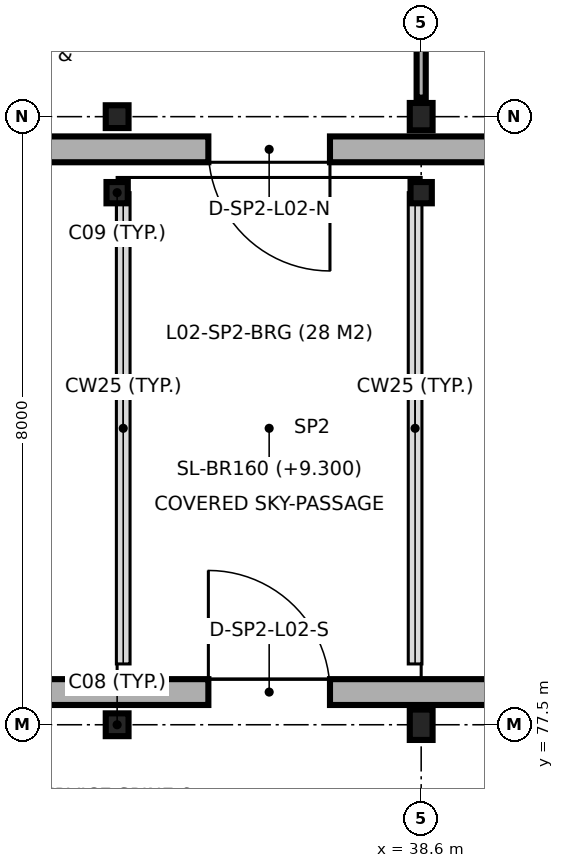
"""IFC4 building model, lengths in metres.
Left out: names, types, materials, properties, quantities, classifications, styles, units other than length and angle.
Written with IfcOpenShell. Run it as: python <this file> out.ifc"""

import sys

from ifc_helpers import new_model, si_unit, direction, frame, frame_2d, origin, origin_2d, place, context, subcontext, project, spatial, rectangle, i_section, extrude, element, fill, save


model = new_model("IFC4")
c1 = context("Model", 3, precision=1e-05, world=origin(), true_north=direction((0.0, 1.0)))
c2 = subcontext(c1, "Body", "Model", "MODEL_VIEW")
j1 = project(units=[si_unit("LENGTHUNIT", "METRE"), si_unit("PLANEANGLEUNIT", "RADIAN")], contexts=[c1])
p1 = place(None, origin())
s1 = spatial("IfcSite", under=j1, at=p1, CompositionType="ELEMENT")
p2 = place(p1, origin())
s2 = spatial("IfcBuilding", under=s1, at=p2, CompositionType="ELEMENT")
p3 = place(p2, frame((0.0, 0.0, 9.3)))
s3 = spatial("IfcBuildingStorey", under=s2, at=p3, CompositionType="ELEMENT", Elevation=9.3)
p4 = place(p3, frame((34.6, 77.5, 0.0), z_axis=(0.0, 0.0, 1.0), x_axis=(1.0, 0.0, 0.0)))
e1 = element("IfcColumn", 1, at=p4, inside=s3, PredefinedType="COLUMN", context=c2, shape_type="SweptSolid", body=[
    extrude(i_section(OverallWidth=0.3, OverallDepth=0.3, WebThickness=0.011, FlangeThickness=0.019, FilletRadius=0.027, at=origin_2d()), origin(), (0.0, 0.0, 1.0), 4.5),
])
p5 = place(p3, frame((34.6, 84.5, 0.0), z_axis=(0.0, 0.0, 1.0), x_axis=(1.0, 0.0, 0.0)))
e2 = element("IfcColumn", 2, at=p5, inside=s3, PredefinedType="COLUMN", context=c2, shape_type="SweptSolid", body=[
    extrude(i_section(OverallWidth=0.28, OverallDepth=0.28, WebThickness=0.01, FlangeThickness=0.018, FilletRadius=0.024, at=origin_2d()), origin(), (0.0, 0.0, 1.0), 4.5),
])
p6 = place(p3, frame((34.6, 85.5, 0.0), z_axis=(0.0, 0.0, 1.0), x_axis=(1.0, 0.0, 0.0)))
e3 = element("IfcColumn", 3, at=p6, inside=s3, PredefinedType="COLUMN", context=c2, shape_type="SweptSolid", body=[
    extrude(i_section(OverallWidth=0.3, OverallDepth=0.3, WebThickness=0.011, FlangeThickness=0.019, FilletRadius=0.027, at=origin_2d()), origin(), (0.0, 0.0, 1.0), 4.5),
])
p7 = place(p3, frame((38.6, 77.5, 0.0), z_axis=(0.0, 0.0, 1.0), x_axis=(1.0, 0.0, 0.0)))
e4 = element("IfcColumn", 4, at=p7, inside=s3, PredefinedType="COLUMN", context=c2, shape_type="SweptSolid", body=[
    extrude(i_section(OverallWidth=0.3, OverallDepth=0.4, WebThickness=0.013, FlangeThickness=0.024, FilletRadius=0.027, at=origin_2d()), origin(), (0.0, 0.0, 1.0), 4.5),
])
p8 = place(p3, frame((38.6, 84.5, 0.0), z_axis=(0.0, 0.0, 1.0), x_axis=(1.0, 0.0, 0.0)))
e5 = element("IfcColumn", 5, at=p8, inside=s3, PredefinedType="COLUMN", context=c2, shape_type="SweptSolid", body=[
    extrude(i_section(OverallWidth=0.28, OverallDepth=0.28, WebThickness=0.01, FlangeThickness=0.018, FilletRadius=0.024, at=origin_2d()), origin(), (0.0, 0.0, 1.0), 4.5),
])
p9 = place(p3, frame((38.6, 85.5, 0.0), z_axis=(0.0, 0.0, 1.0), x_axis=(1.0, 0.0, 0.0)))
e6 = element("IfcColumn", 6, at=p9, inside=s3, PredefinedType="COLUMN", context=c2, shape_type="SweptSolid", body=[
    extrude(i_section(OverallWidth=0.3, OverallDepth=0.36, WebThickness=0.012, FlangeThickness=0.022, FilletRadius=0.027, at=origin_2d()), origin(), (0.0, 0.0, 1.0), 4.5),
])
p10 = place(p3, frame((43.677, 77.93, 0.0), z_axis=(0.0, 0.0, 1.0), x_axis=(-1.0, 0.0, 0.0)))
e7 = element("IfcWall", 7, at=p10, inside=s3, PredefinedType="SOLIDWALL", context=c2, shape_type="SweptSolid", body=[
    extrude(rectangle(XDim=38.077, YDim=0.34, at=frame_2d((19.039, 0.0))), origin(), (0.0, 0.0, 1.0), 4.25),
])
p11 = place(p10, frame((6.277, 0.0, 0.0)))
e8 = element("IfcOpeningElement", 8, at=p11, cuts=e7, PredefinedType="OPENING", context=c2, shape_type="SweptSolid", body=[
    extrude(rectangle(XDim=1.6, YDim=2.2, at=frame_2d((0.8, 1.1))), frame((0.0, 0.18, 0.0), z_axis=(0.0, -1.0, 0.0), x_axis=(1.0, 0.0, 0.0)), (0.0, 0.0, 1.0), 0.36),
])
p12 = place(p10, frame((1.689, 0.0, 0.9)))
e9 = element("IfcOpeningElement", 9, at=p12, cuts=e7, PredefinedType="OPENING", context=c2, shape_type="SweptSolid", body=[
    extrude(rectangle(XDim=1.8, YDim=1.5, at=frame_2d((0.9, 0.75))), frame((0.0, 0.18, 0.0), z_axis=(0.0, -1.0, 0.0), x_axis=(1.0, 0.0, 0.0)), (0.0, 0.0, 1.0), 0.36),
])
p13 = place(p10, frame((10.657, 0.0, 0.9)))
e10 = element("IfcOpeningElement", 10, at=p13, cuts=e7, PredefinedType="OPENING", context=c2, shape_type="SweptSolid", body=[
    extrude(rectangle(XDim=1.2, YDim=2.4, at=frame_2d((0.6, 1.2))), frame((0.0, 0.18, 0.0), z_axis=(0.0, -1.0, 0.0), x_axis=(1.0, 0.0, 0.0)), (0.0, 0.0, 1.0), 0.36),
])
p14 = place(p10, frame((16.077, 0.0, 0.9)))
e11 = element("IfcOpeningElement", 11, at=p14, cuts=e7, PredefinedType="OPENING", context=c2, shape_type="SweptSolid", body=[
    extrude(rectangle(XDim=2.0, YDim=2.4, at=frame_2d((1.0, 1.2))), frame((0.0, 0.18, 0.0), z_axis=(0.0, -1.0, 0.0), x_axis=(1.0, 0.0, 0.0)), (0.0, 0.0, 1.0), 0.36),
])
p15 = place(p10, frame((23.477, 0.0, 0.9)))
e12 = element("IfcOpeningElement", 12, at=p15, cuts=e7, PredefinedType="OPENING", context=c2, shape_type="SweptSolid", body=[
    extrude(rectangle(XDim=3.2, YDim=2.4, at=frame_2d((1.6, 1.2))), frame((0.0, 0.18, 0.0), z_axis=(0.0, -1.0, 0.0), x_axis=(1.0, 0.0, 0.0)), (0.0, 0.0, 1.0), 0.36),
])
p16 = place(p10, frame((32.627, 0.0, 0.9)))
e13 = element("IfcOpeningElement", 13, at=p16, cuts=e7, PredefinedType="OPENING", context=c2, shape_type="SweptSolid", body=[
    extrude(rectangle(XDim=0.9, YDim=1.4, at=frame_2d((0.45, 0.7))), frame((0.0, 0.18, 0.0), z_axis=(0.0, -1.0, 0.0), x_axis=(1.0, 0.0, 0.0)), (0.0, 0.0, 1.0), 0.36),
])
p17 = place(p3, frame((5.922, 85.07, 0.0), z_axis=(0.0, 0.0, 1.0), x_axis=(1.0, 0.0, 0.0)))
e14 = element("IfcWall", 14, at=p17, inside=s3, PredefinedType="SOLIDWALL", context=c2, shape_type="SweptSolid", body=[
    extrude(rectangle(XDim=37.878, YDim=0.34, at=frame_2d((18.939, 0.0))), origin(), (0.0, 0.0, 1.0), 4.25),
])
p18 = place(p17, frame((29.878, 0.0, 0.0)))
e15 = element("IfcOpeningElement", 15, at=p18, cuts=e14, PredefinedType="OPENING", context=c2, shape_type="SweptSolid", body=[
    extrude(rectangle(XDim=1.6, YDim=2.2, at=frame_2d((0.8, 1.1))), frame((0.0, 0.18, 0.0), z_axis=(0.0, -1.0, 0.0), x_axis=(1.0, 0.0, 0.0)), (0.0, 0.0, 1.0), 0.36),
])
p19 = place(p17, frame((4.078, 0.0, 0.9)))
e16 = element("IfcOpeningElement", 16, at=p19, cuts=e14, PredefinedType="OPENING", context=c2, shape_type="SweptSolid", body=[
    extrude(rectangle(XDim=1.2, YDim=2.4, at=frame_2d((0.6, 1.2))), frame((0.0, 0.18, 0.0), z_axis=(0.0, -1.0, 0.0), x_axis=(1.0, 0.0, 0.0)), (0.0, 0.0, 1.0), 0.36),
])
p20 = place(p17, frame((9.398, 0.0, 0.9)))
e17 = element("IfcOpeningElement", 17, at=p20, cuts=e14, PredefinedType="OPENING", context=c2, shape_type="SweptSolid", body=[
    extrude(rectangle(XDim=1.2, YDim=1.8, at=frame_2d((0.6, 0.9))), frame((0.0, 0.18, 0.0), z_axis=(0.0, -1.0, 0.0), x_axis=(1.0, 0.0, 0.0)), (0.0, 0.0, 1.0), 0.36),
])
p21 = place(p17, frame((11.938, 0.0, 0.9)))
e18 = element("IfcOpeningElement", 18, at=p21, cuts=e14, PredefinedType="OPENING", context=c2, shape_type="SweptSolid", body=[
    extrude(rectangle(XDim=3.2, YDim=2.4, at=frame_2d((1.6, 1.2))), frame((0.0, 0.18, 0.0), z_axis=(0.0, -1.0, 0.0), x_axis=(1.0, 0.0, 0.0)), (0.0, 0.0, 1.0), 0.36),
])
p22 = place(p17, frame((18.548, 0.0, 0.9)))
e19 = element("IfcOpeningElement", 19, at=p22, cuts=e14, PredefinedType="OPENING", context=c2, shape_type="SweptSolid", body=[
    extrude(rectangle(XDim=0.9, YDim=1.4, at=frame_2d((0.45, 0.7))), frame((0.0, 0.18, 0.0), z_axis=(0.0, -1.0, 0.0), x_axis=(1.0, 0.0, 0.0)), (0.0, 0.0, 1.0), 0.36),
])
p23 = place(p17, frame((22.383, 0.0, 0.9)))
e20 = element("IfcOpeningElement", 20, at=p23, cuts=e14, PredefinedType="OPENING", context=c2, shape_type="SweptSolid", body=[
    extrude(rectangle(XDim=1.35, YDim=1.95, at=frame_2d((0.675, 0.975))), frame((0.0, 0.18, 0.0), z_axis=(0.0, -1.0, 0.0), x_axis=(1.0, 0.0, 0.0)), (0.0, 0.0, 1.0), 0.36),
])
p24 = place(p17, frame((25.583, 0.0, 0.9)))
e21 = element("IfcOpeningElement", 21, at=p24, cuts=e14, PredefinedType="OPENING", context=c2, shape_type="SweptSolid", body=[
    extrude(rectangle(XDim=1.95, YDim=1.95, at=frame_2d((0.975, 0.975))), frame((0.0, 0.18, 0.0), z_axis=(0.0, -1.0, 0.0), x_axis=(1.0, 0.0, 0.0)), (0.0, 0.0, 1.0), 0.36),
])
p25 = place(p17, frame((33.953, 0.0, 0.9)))
e22 = element("IfcOpeningElement", 22, at=p25, cuts=e14, PredefinedType="OPENING", context=c2, shape_type="SweptSolid", body=[
    extrude(rectangle(XDim=2.55, YDim=1.95, at=frame_2d((1.275, 0.975))), frame((0.0, 0.18, 0.0), z_axis=(0.0, -1.0, 0.0), x_axis=(1.0, 0.0, 0.0)), (0.0, 0.0, 1.0), 0.36),
])
p26 = place(p3, frame((38.6, 85.75, 0.0), z_axis=(0.0, 0.0, 1.0), x_axis=(0.0, 1.0, 0.0)))
e23 = element("IfcWall", 23, at=p26, inside=s3, PredefinedType="PARTITIONING", context=c2, shape_type="SweptSolid", body=[
    extrude(rectangle(XDim=7.5, YDim=0.12, at=frame_2d((3.75, 0.0))), origin(), (0.0, 0.0, 1.0), 3.85),
])
p27 = place(p26, frame((5.33, 0.0, 0.0)))
e24 = element("IfcOpeningElement", 24, at=p27, cuts=e23, PredefinedType="OPENING", context=c2, shape_type="SweptSolid", body=[
    extrude(rectangle(XDim=1.0, YDim=2.15, at=frame_2d((0.5, 1.075))), frame((0.0, 0.07, 0.0), z_axis=(0.0, -1.0, 0.0), x_axis=(1.0, 0.0, 0.0)), (0.0, 0.0, 1.0), 0.14),
])
p28 = place(p11, frame((1.6, 0.0, 0.0), z_axis=(0.0, 0.0, 1.0), x_axis=(-1.0, 0.0, 0.0)))
e25 = element("IfcDoor", 25, at=p28, inside=s3, OperationType="SINGLE_SWING_RIGHT", PredefinedType="DOOR", context=c2, shape_type="SweptSolid", body=[
    extrude(rectangle(XDim=1.6, YDim=2.2, at=frame_2d((0.8, 1.1))), frame((0.0, 0.025, 0.0), z_axis=(0.0, -1.0, 0.0), x_axis=(1.0, 0.0, 0.0)), (0.0, 0.0, 1.0), 0.05),
])
fill(e8, e25)
p29 = place(p18, frame((1.6, 0.0, 0.0), z_axis=(0.0, 0.0, 1.0), x_axis=(-1.0, 0.0, 0.0)))
e26 = element("IfcDoor", 26, at=p29, inside=s3, OperationType="SINGLE_SWING_RIGHT", PredefinedType="DOOR", context=c2, shape_type="SweptSolid", body=[
    extrude(rectangle(XDim=1.6, YDim=2.2, at=frame_2d((0.8, 1.1))), frame((0.0, 0.025, 0.0), z_axis=(0.0, -1.0, 0.0), x_axis=(1.0, 0.0, 0.0)), (0.0, 0.0, 1.0), 0.05),
])
fill(e15, e26)
save(model, sys.argv[1])
